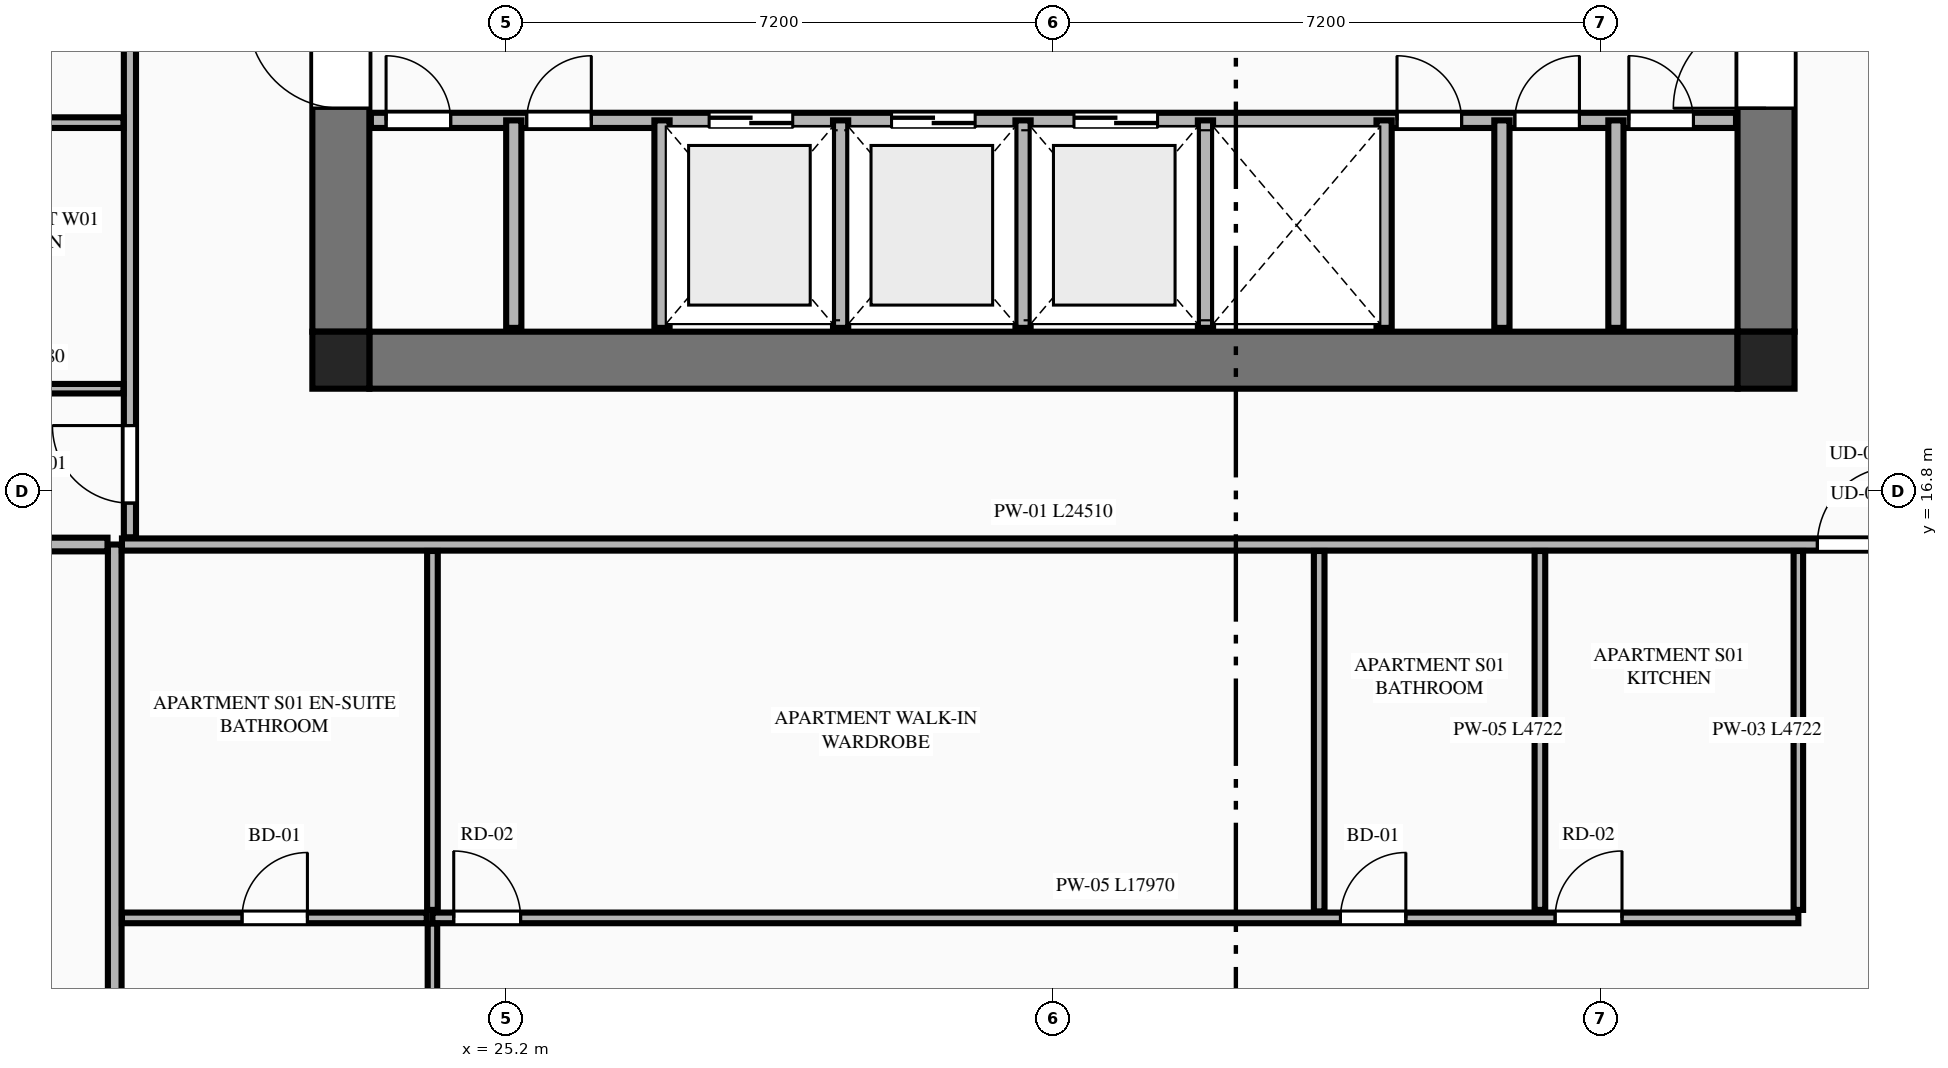
"""IFC4 building model, lengths in metres.
Left out: names, types, materials, properties, quantities, classifications, styles, units other than length and angle.
Written with IfcOpenShell. Run it as: python <this file> out.ifc"""

import sys

from ifc_helpers import new_model, si_unit, direction, frame, frame_2d, origin, origin_2d, place, context, subcontext, project, spatial, rectangle, extrude, element, fill, save


model = new_model("IFC4")
c1 = context("Model", 3, precision=1e-05, world=origin(), true_north=direction((0.0, 1.0)))
c2 = subcontext(c1, "Body", "Model", "MODEL_VIEW")
j1 = project(units=[si_unit("LENGTHUNIT", "METRE"), si_unit("PLANEANGLEUNIT", "RADIAN")], contexts=[c1])
p1 = place(None, origin())
s1 = spatial("IfcSite", under=j1, at=p1, CompositionType="ELEMENT")
p2 = place(p1, origin())
s2 = spatial("IfcBuilding", under=s1, at=p2, CompositionType="ELEMENT")
p3 = place(p2, frame((0.0, 0.0, 80.0)))
s3 = spatial("IfcBuildingStorey", under=s2, at=p3, CompositionType="ELEMENT", Elevation=80.0)
for number, where, z_axis, x_axis in (
    (1, (23.025, 18.525, 0.0), (0.0, 0.0, 1.0), (1.0, 0.0, 0.0)),
    (2, (41.775, 18.525, 0.0), (0.0, 0.0, 1.0), (1.0, 0.0, 0.0)),
):
    element("IfcColumn", number, at=place(p3, frame(where, z_axis=z_axis, x_axis=x_axis)), inside=s3, PredefinedType="COLUMN", context=c2, shape_type="SweptSolid", body=[
        extrude(rectangle(XDim=0.75, YDim=0.75, at=origin_2d()), origin(), (0.0, 0.0, 1.0), 3.55),
    ])
p4 = place(p3, frame((23.4, 18.525, 0.0), z_axis=(0.0, 0.0, 1.0), x_axis=(1.0, 0.0, 0.0)))
e3 = element("IfcWall", 3, at=p4, inside=s3, PredefinedType="SHEAR", context=c2, shape_type="SweptSolid", body=[
    extrude(rectangle(XDim=18.0, YDim=0.75, at=frame_2d((9.0, 0.0))), origin(), (0.0, 0.0, 1.0), 3.33),
])
p5 = place(p3, frame((23.025, 18.9, 0.0), z_axis=(0.0, 0.0, 1.0), x_axis=(0.0, 1.0, 0.0)))
e4 = element("IfcWall", 4, at=p5, inside=s3, PredefinedType="SHEAR", context=c2, shape_type="SweptSolid", body=[
    extrude(rectangle(XDim=14.0, YDim=0.75, at=frame_2d((7.0, 0.0))), origin(), (0.0, 0.0, 1.0), 3.33),
])
p6 = place(p5, frame((2.94, 0.0, 0.0)))
e5 = element("IfcOpeningElement", 5, at=p6, cuts=e4, PredefinedType="OPENING", context=c2, shape_type="SweptSolid", body=[
    extrude(rectangle(XDim=1.22, YDim=2.25, at=frame_2d((0.61, 1.125))), frame((0.0, 0.385, 0.0), z_axis=(0.0, -1.0, 0.0), x_axis=(1.0, 0.0, 0.0)), (0.0, 0.0, 1.0), 0.77),
])
p7 = place(p3, frame((41.775, 18.9, 0.0), z_axis=(0.0, 0.0, 1.0), x_axis=(0.0, 1.0, 0.0)))
e6 = element("IfcWall", 6, at=p7, inside=s3, PredefinedType="SHEAR", context=c2, shape_type="SweptSolid", body=[
    extrude(rectangle(XDim=14.0, YDim=0.75, at=frame_2d((7.0, 0.0))), origin(), (0.0, 0.0, 1.0), 3.33),
])
p8 = place(p7, frame((2.94, 0.0, 0.0)))
e7 = element("IfcOpeningElement", 7, at=p8, cuts=e6, PredefinedType="OPENING", context=c2, shape_type="SweptSolid", body=[
    extrude(rectangle(XDim=1.22, YDim=2.25, at=frame_2d((0.61, 1.125))), frame((0.0, 0.385, 0.0), z_axis=(0.0, -1.0, 0.0), x_axis=(1.0, 0.0, 0.0)), (0.0, 0.0, 1.0), 0.77),
])
p9 = place(p3, frame((23.42, 21.68, 0.0), z_axis=(0.0, 0.0, 1.0), x_axis=(1.0, 0.0, 0.0)))
e8 = element("IfcWall", 8, at=p9, inside=s3, PredefinedType="PLUMBINGWALL", context=c2, shape_type="SweptSolid", body=[
    extrude(rectangle(XDim=17.96, YDim=0.2, at=frame_2d((8.98, 0.0))), origin(), (0.0, 0.0, 1.0), 3.33),
])
p10 = place(p9, frame((4.45, 0.0, 0.0)))
e9 = element("IfcOpeningElement", 9, at=p10, cuts=e8, PredefinedType="OPENING", context=c2, shape_type="SweptSolid", body=[
    extrude(rectangle(XDim=1.1, YDim=2.2, at=frame_2d((0.55, 1.1))), frame((0.0, 0.11, 0.0), z_axis=(0.0, -1.0, 0.0), x_axis=(1.0, 0.0, 0.0)), (0.0, 0.0, 1.0), 0.22),
])
p11 = place(p9, frame((6.85, 0.0, 0.0)))
e10 = element("IfcOpeningElement", 10, at=p11, cuts=e8, PredefinedType="OPENING", context=c2, shape_type="SweptSolid", body=[
    extrude(rectangle(XDim=1.1, YDim=2.2, at=frame_2d((0.55, 1.1))), frame((0.0, 0.11, 0.0), z_axis=(0.0, -1.0, 0.0), x_axis=(1.0, 0.0, 0.0)), (0.0, 0.0, 1.0), 0.22),
])
p12 = place(p9, frame((9.25, 0.0, 0.0)))
e11 = element("IfcOpeningElement", 11, at=p12, cuts=e8, PredefinedType="OPENING", context=c2, shape_type="SweptSolid", body=[
    extrude(rectangle(XDim=1.1, YDim=2.2, at=frame_2d((0.55, 1.1))), frame((0.0, 0.11, 0.0), z_axis=(0.0, -1.0, 0.0), x_axis=(1.0, 0.0, 0.0)), (0.0, 0.0, 1.0), 0.22),
])
p13 = place(p9, frame((0.2, 0.0, 0.0)))
e12 = element("IfcOpeningElement", 12, at=p13, cuts=e8, PredefinedType="OPENING", context=c2, shape_type="SweptSolid", body=[
    extrude(rectangle(XDim=0.85, YDim=2.05, at=frame_2d((0.425, 1.025))), frame((0.0, 0.11, 0.0), z_axis=(0.0, -1.0, 0.0), x_axis=(1.0, 0.0, 0.0)), (0.0, 0.0, 1.0), 0.22),
])
p14 = place(p9, frame((2.05, 0.0, 0.0)))
e13 = element("IfcOpeningElement", 13, at=p14, cuts=e8, PredefinedType="OPENING", context=c2, shape_type="SweptSolid", body=[
    extrude(rectangle(XDim=0.85, YDim=2.05, at=frame_2d((0.425, 1.025))), frame((0.0, 0.11, 0.0), z_axis=(0.0, -1.0, 0.0), x_axis=(1.0, 0.0, 0.0)), (0.0, 0.0, 1.0), 0.22),
])
p15 = place(p9, frame((13.5, 0.0, 0.0)))
e14 = element("IfcOpeningElement", 14, at=p15, cuts=e8, PredefinedType="OPENING", context=c2, shape_type="SweptSolid", body=[
    extrude(rectangle(XDim=0.85, YDim=2.05, at=frame_2d((0.425, 1.025))), frame((0.0, 0.11, 0.0), z_axis=(0.0, -1.0, 0.0), x_axis=(1.0, 0.0, 0.0)), (0.0, 0.0, 1.0), 0.22),
])
p16 = place(p9, frame((15.05, 0.0, 0.0)))
e15 = element("IfcOpeningElement", 15, at=p16, cuts=e8, PredefinedType="OPENING", context=c2, shape_type="SweptSolid", body=[
    extrude(rectangle(XDim=0.85, YDim=2.05, at=frame_2d((0.425, 1.025))), frame((0.0, 0.11, 0.0), z_axis=(0.0, -1.0, 0.0), x_axis=(1.0, 0.0, 0.0)), (0.0, 0.0, 1.0), 0.22),
])
p17 = place(p9, frame((16.55, 0.0, 0.0)))
e16 = element("IfcOpeningElement", 16, at=p17, cuts=e8, PredefinedType="OPENING", context=c2, shape_type="SweptSolid", body=[
    extrude(rectangle(XDim=0.85, YDim=2.05, at=frame_2d((0.425, 1.025))), frame((0.0, 0.11, 0.0), z_axis=(0.0, -1.0, 0.0), x_axis=(1.0, 0.0, 0.0)), (0.0, 0.0, 1.0), 0.22),
])
for number, where, z_axis, x_axis in (
    (17, (27.25, 18.95, 0.0), (0.0, 0.0, 1.0), (0.0, 1.0, 0.0)),
    (18, (29.6, 18.95, 0.0), (0.0, 0.0, 1.0), (0.0, 1.0, 0.0)),
    (19, (32.0, 18.95, 0.0), (0.0, 0.0, 1.0), (0.0, 1.0, 0.0)),
    (20, (34.4, 18.95, 0.0), (0.0, 0.0, 1.0), (0.0, 1.0, 0.0)),
    (21, (36.75, 18.95, 0.0), (0.0, 0.0, 1.0), (0.0, 1.0, 0.0)),
    (22, (25.3, 18.95, 0.0), (0.0, 0.0, 1.0), (0.0, 1.0, 0.0)),
    (23, (38.3, 18.95, 0.0), (0.0, 0.0, 1.0), (0.0, 1.0, 0.0)),
    (24, (39.8, 18.95, 0.0), (0.0, 0.0, 1.0), (0.0, 1.0, 0.0)),
):
    element("IfcWall", number, at=place(p3, frame(where, z_axis=z_axis, x_axis=x_axis)), inside=s3, PredefinedType="PLUMBINGWALL", context=c2, shape_type="SweptSolid", body=[
        extrude(rectangle(XDim=2.73, YDim=0.2, at=frame_2d((1.365, 0.0))), origin(), (0.0, 0.0, 1.0), 3.33),
    ])
p18 = place(p3, frame((20.05, 2.455, 0.0), z_axis=(0.0, 0.0, 1.0), x_axis=(0.0, 1.0, 0.0)))
e25 = element("IfcWall", 25, at=p18, inside=s3, PredefinedType="PARTITIONING", context=c2, shape_type="SweptSolid", body=[
    extrude(rectangle(XDim=13.645, YDim=0.18, at=frame_2d((6.823, 0.0))), origin(), (0.0, 0.0, 1.0), 3.33),
])
p19 = place(p3, frame((20.145, 16.1, 0.0), z_axis=(0.0, 0.0, 1.0), x_axis=(1.0, 0.0, 0.0)))
e26 = element("IfcWall", 26, at=p19, inside=s3, PredefinedType="PARTITIONING", context=c2, shape_type="SweptSolid", body=[
    extrude(rectangle(XDim=24.51, YDim=0.16, at=frame_2d((12.255, 0.0))), origin(), (0.0, 0.0, 1.0), 3.33),
])
p20 = place(p19, frame((22.305, 0.0, 0.0)))
e27 = element("IfcOpeningElement", 27, at=p20, cuts=e26, PredefinedType="OPENING", context=c2, shape_type="SweptSolid", body=[
    extrude(rectangle(XDim=1.02, YDim=2.25, at=frame_2d((0.51, 1.125))), frame((0.0, 0.09, 0.0), z_axis=(0.0, -1.0, 0.0), x_axis=(1.0, 0.0, 0.0)), (0.0, 0.0, 1.0), 0.18),
])
p21 = place(p3, frame((42.2, 11.293, 0.0), z_axis=(0.0, 0.0, 1.0), x_axis=(0.0, 1.0, 0.0)))
e28 = element("IfcWall", 28, at=p21, inside=s3, PredefinedType="PARTITIONING", context=c2, shape_type="SweptSolid", body=[
    extrude(rectangle(XDim=4.722, YDim=0.125, at=frame_2d((2.361, 0.0))), origin(), (0.0, 0.0, 1.0), 2.7),
])
p22 = place(p3, frame((24.23, 11.188, 0.0), z_axis=(0.0, 0.0, 1.0), x_axis=(1.0, 0.0, 0.0)))
e29 = element("IfcWall", 29, at=p22, inside=s3, PredefinedType="PLUMBINGWALL", context=c2, shape_type="SweptSolid", body=[
    extrude(rectangle(XDim=17.97, YDim=0.14, at=frame_2d((8.985, 0.0))), origin(), (0.0, 0.0, 1.0), 3.33),
])
p23 = place(p22, frame((0.28, 0.0, 0.0)))
e30 = element("IfcOpeningElement", 30, at=p23, cuts=e29, PredefinedType="OPENING", context=c2, shape_type="SweptSolid", body=[
    extrude(rectangle(XDim=0.88, YDim=2.15, at=frame_2d((0.44, 1.075))), frame((0.0, 0.08, 0.0), z_axis=(0.0, -1.0, 0.0), x_axis=(1.0, 0.0, 0.0)), (0.0, 0.0, 1.0), 0.16),
])
p24 = place(p22, frame((11.946, 0.0, 0.0)))
e31 = element("IfcOpeningElement", 31, at=p24, cuts=e29, PredefinedType="OPENING", context=c2, shape_type="SweptSolid", body=[
    extrude(rectangle(XDim=0.86, YDim=2.1, at=frame_2d((0.43, 1.05))), frame((0.0, 0.08, 0.0), z_axis=(0.0, -1.0, 0.0), x_axis=(1.0, 0.0, 0.0)), (0.0, 0.0, 1.0), 0.16),
])
p25 = place(p22, frame((14.77, 0.0, 0.0)))
e32 = element("IfcOpeningElement", 32, at=p25, cuts=e29, PredefinedType="OPENING", context=c2, shape_type="SweptSolid", body=[
    extrude(rectangle(XDim=0.88, YDim=2.15, at=frame_2d((0.44, 1.075))), frame((0.0, 0.08, 0.0), z_axis=(0.0, -1.0, 0.0), x_axis=(1.0, 0.0, 0.0)), (0.0, 0.0, 1.0), 0.16),
])
p26 = place(p3, frame((20.145, 11.188, 0.0), z_axis=(0.0, 0.0, 1.0), x_axis=(1.0, 0.0, 0.0)))
e33 = element("IfcWall", 33, at=p26, inside=s3, PredefinedType="PLUMBINGWALL", context=c2, shape_type="SweptSolid", body=[
    extrude(rectangle(XDim=4.01, YDim=0.14, at=frame_2d((2.005, 0.0))), origin(), (0.0, 0.0, 1.0), 3.33),
])
p27 = place(p26, frame((1.58, 0.0, 0.0)))
e34 = element("IfcOpeningElement", 34, at=p27, cuts=e33, PredefinedType="OPENING", context=c2, shape_type="SweptSolid", body=[
    extrude(rectangle(XDim=0.86, YDim=2.1, at=frame_2d((0.43, 1.05))), frame((0.0, 0.08, 0.0), z_axis=(0.0, -1.0, 0.0), x_axis=(1.0, 0.0, 0.0)), (0.0, 0.0, 1.0), 0.16),
])
for number, where, z_axis, x_axis in (
    (35, (38.8, 11.293, 0.0), (0.0, 0.0, 1.0), (0.0, 1.0, 0.0)),
    (36, (24.23, 11.293, 0.0), (0.0, 0.0, 1.0), (0.0, 1.0, 0.0)),
):
    element("IfcWall", number, at=place(p3, frame(where, z_axis=z_axis, x_axis=x_axis)), inside=s3, PredefinedType="PLUMBINGWALL", context=c2, shape_type="SweptSolid", body=[
        extrude(rectangle(XDim=4.722, YDim=0.14, at=frame_2d((2.361, 0.0))), origin(), (0.0, 0.0, 1.0), 3.33),
    ])
p28 = place(p3, frame((24.23, 2.365, 0.0), z_axis=(0.0, 0.0, 1.0), x_axis=(0.0, 1.0, 0.0)))
e37 = element("IfcWall", 37, at=p28, inside=s3, PredefinedType="PARTITIONING", context=c2, shape_type="SweptSolid", body=[
    extrude(rectangle(XDim=8.748, YDim=0.125, at=frame_2d((4.374, 0.0))), origin(), (0.0, 0.0, 1.0), 3.33),
])
p29 = place(p28, frame((0.35, 0.0, 0.0)))
e38 = element("IfcOpeningElement", 38, at=p29, cuts=e37, PredefinedType="OPENING", context=c2, shape_type="SweptSolid", body=[
    extrude(rectangle(XDim=0.92, YDim=2.15, at=frame_2d((0.46, 1.075))), frame((0.0, 0.073, 0.0), z_axis=(0.0, -1.0, 0.0), x_axis=(1.0, 0.0, 0.0)), (0.0, 0.0, 1.0), 0.145),
])
p30 = place(p3, frame((35.896, 11.273, 0.0), z_axis=(0.0, 0.0, 1.0), x_axis=(0.0, 1.0, 0.0)))
e39 = element("IfcWall", 39, at=p30, inside=s3, PredefinedType="PLUMBINGWALL", context=c2, shape_type="SweptSolid", body=[
    extrude(rectangle(XDim=4.742, YDim=0.14, at=frame_2d((2.371, 0.0))), origin(), (0.0, 0.0, 1.0), 3.33),
])
p31 = place(p3, frame((10.488, 16.1, 0.0), z_axis=(0.0, 0.0, 1.0), x_axis=(1.0, 0.0, 0.0)))
e40 = element("IfcWall", 40, at=p31, inside=s3, PredefinedType="PARTITIONING", context=c2, shape_type="SweptSolid", body=[
    extrude(rectangle(XDim=9.467, YDim=0.18, at=frame_2d((4.733, 0.0))), origin(), (0.0, 0.0, 1.0), 3.33),
])
p32 = place(p3, frame((20.25, 16.195, 0.0), z_axis=(0.0, 0.0, 1.0), x_axis=(0.0, 1.0, 0.0)))
e41 = element("IfcWall", 41, at=p32, inside=s3, PredefinedType="PARTITIONING", context=c2, shape_type="SweptSolid", body=[
    extrude(rectangle(XDim=19.41, YDim=0.16, at=frame_2d((9.705, 0.0))), origin(), (0.0, 0.0, 1.0), 2.7),
])
p33 = place(p32, frame((0.45, 0.0, 0.0)))
e42 = element("IfcOpeningElement", 42, at=p33, cuts=e41, PredefinedType="OPENING", context=c2, shape_type="SweptSolid", body=[
    extrude(rectangle(XDim=1.02, YDim=2.25, at=frame_2d((0.51, 1.125))), frame((0.0, 0.09, 0.0), z_axis=(0.0, -1.0, 0.0), x_axis=(1.0, 0.0, 0.0)), (0.0, 0.0, 1.0), 0.18),
])
p34 = place(p3, frame((17.185, 18.15, 0.0), z_axis=(0.0, 0.0, 1.0), x_axis=(1.0, 0.0, 0.0)))
e43 = element("IfcWall", 43, at=p34, inside=s3, PredefinedType="PARTITIONING", context=c2, shape_type="SweptSolid", body=[
    extrude(rectangle(XDim=2.98, YDim=0.125, at=frame_2d((1.49, 0.0))), origin(), (0.0, 0.0, 1.0), 2.7),
])
p35 = place(p3, frame((17.185, 21.65, 0.0), z_axis=(0.0, 0.0, 1.0), x_axis=(1.0, 0.0, 0.0)))
e44 = element("IfcWall", 44, at=p35, inside=s3, PredefinedType="PLUMBINGWALL", context=c2, shape_type="SweptSolid", body=[
    extrude(rectangle(XDim=2.98, YDim=0.14, at=frame_2d((1.49, 0.0))), origin(), (0.0, 0.0, 1.0), 3.33),
])
p36 = place(p6, origin())
e45 = element("IfcDoor", 45, at=p36, inside=s3, OperationType="SINGLE_SWING_RIGHT", PredefinedType="DOOR", context=c2, shape_type="SweptSolid", body=[
    extrude(rectangle(XDim=1.22, YDim=2.25, at=frame_2d((0.61, 1.125))), frame((0.0, 0.025, 0.0), z_axis=(0.0, -1.0, 0.0), x_axis=(1.0, 0.0, 0.0)), (0.0, 0.0, 1.0), 0.05),
])
fill(e5, e45)
p37 = place(p8, origin())
e46 = element("IfcDoor", 46, at=p37, inside=s3, OperationType="SINGLE_SWING_LEFT", PredefinedType="DOOR", context=c2, shape_type="SweptSolid", body=[
    extrude(rectangle(XDim=1.22, YDim=2.25, at=frame_2d((0.61, 1.125))), frame((0.0, 0.025, 0.0), z_axis=(0.0, -1.0, 0.0), x_axis=(1.0, 0.0, 0.0)), (0.0, 0.0, 1.0), 0.05),
])
fill(e7, e46)
p38 = place(p10, origin())
e47 = element("IfcDoor", 47, at=p38, inside=s3, OperationType="DOUBLE_DOOR_SLIDING", PredefinedType="DOOR", context=c2, shape_type="SweptSolid", body=[
    extrude(rectangle(XDim=1.1, YDim=2.2, at=frame_2d((0.55, 1.1))), frame((0.0, 0.025, 0.0), z_axis=(0.0, -1.0, 0.0), x_axis=(1.0, 0.0, 0.0)), (0.0, 0.0, 1.0), 0.05),
])
fill(e9, e47)
p39 = place(p11, origin())
e48 = element("IfcDoor", 48, at=p39, inside=s3, OperationType="DOUBLE_DOOR_SLIDING", PredefinedType="DOOR", context=c2, shape_type="SweptSolid", body=[
    extrude(rectangle(XDim=1.1, YDim=2.2, at=frame_2d((0.55, 1.1))), frame((0.0, 0.025, 0.0), z_axis=(0.0, -1.0, 0.0), x_axis=(1.0, 0.0, 0.0)), (0.0, 0.0, 1.0), 0.05),
])
fill(e10, e48)
p40 = place(p12, origin())
e49 = element("IfcDoor", 49, at=p40, inside=s3, OperationType="DOUBLE_DOOR_SLIDING", PredefinedType="DOOR", context=c2, shape_type="SweptSolid", body=[
    extrude(rectangle(XDim=1.1, YDim=2.2, at=frame_2d((0.55, 1.1))), frame((0.0, 0.025, 0.0), z_axis=(0.0, -1.0, 0.0), x_axis=(1.0, 0.0, 0.0)), (0.0, 0.0, 1.0), 0.05),
])
fill(e11, e49)
p41 = place(p13, origin())
e50 = element("IfcDoor", 50, at=p41, inside=s3, OperationType="SINGLE_SWING_LEFT", PredefinedType="DOOR", context=c2, shape_type="SweptSolid", body=[
    extrude(rectangle(XDim=0.85, YDim=2.05, at=frame_2d((0.425, 1.025))), frame((0.0, 0.025, 0.0), z_axis=(0.0, -1.0, 0.0), x_axis=(1.0, 0.0, 0.0)), (0.0, 0.0, 1.0), 0.05),
])
fill(e12, e50)
p42 = place(p14, origin())
e51 = element("IfcDoor", 51, at=p42, inside=s3, OperationType="SINGLE_SWING_RIGHT", PredefinedType="DOOR", context=c2, shape_type="SweptSolid", body=[
    extrude(rectangle(XDim=0.85, YDim=2.05, at=frame_2d((0.425, 1.025))), frame((0.0, 0.025, 0.0), z_axis=(0.0, -1.0, 0.0), x_axis=(1.0, 0.0, 0.0)), (0.0, 0.0, 1.0), 0.05),
])
fill(e13, e51)
p43 = place(p15, origin())
e52 = element("IfcDoor", 52, at=p43, inside=s3, OperationType="SINGLE_SWING_LEFT", PredefinedType="DOOR", context=c2, shape_type="SweptSolid", body=[
    extrude(rectangle(XDim=0.85, YDim=2.05, at=frame_2d((0.425, 1.025))), frame((0.0, 0.025, 0.0), z_axis=(0.0, -1.0, 0.0), x_axis=(1.0, 0.0, 0.0)), (0.0, 0.0, 1.0), 0.05),
])
fill(e14, e52)
p44 = place(p16, origin())
e53 = element("IfcDoor", 53, at=p44, inside=s3, OperationType="SINGLE_SWING_RIGHT", PredefinedType="DOOR", context=c2, shape_type="SweptSolid", body=[
    extrude(rectangle(XDim=0.85, YDim=2.05, at=frame_2d((0.425, 1.025))), frame((0.0, 0.025, 0.0), z_axis=(0.0, -1.0, 0.0), x_axis=(1.0, 0.0, 0.0)), (0.0, 0.0, 1.0), 0.05),
])
fill(e15, e53)
p45 = place(p17, origin())
e54 = element("IfcDoor", 54, at=p45, inside=s3, OperationType="SINGLE_SWING_LEFT", PredefinedType="DOOR", context=c2, shape_type="SweptSolid", body=[
    extrude(rectangle(XDim=0.85, YDim=2.05, at=frame_2d((0.425, 1.025))), frame((0.0, 0.025, 0.0), z_axis=(0.0, -1.0, 0.0), x_axis=(1.0, 0.0, 0.0)), (0.0, 0.0, 1.0), 0.05),
])
fill(e16, e54)
p46 = place(p23, origin())
e55 = element("IfcDoor", 55, at=p46, inside=s3, OperationType="SINGLE_SWING_LEFT", PredefinedType="DOOR", context=c2, shape_type="SweptSolid", body=[
    extrude(rectangle(XDim=0.88, YDim=2.15, at=frame_2d((0.44, 1.075))), frame((0.0, 0.025, 0.0), z_axis=(0.0, -1.0, 0.0), x_axis=(1.0, 0.0, 0.0)), (0.0, 0.0, 1.0), 0.05),
])
fill(e30, e55)
p47 = place(p24, origin())
e56 = element("IfcDoor", 56, at=p47, inside=s3, OperationType="SINGLE_SWING_RIGHT", PredefinedType="DOOR", context=c2, shape_type="SweptSolid", body=[
    extrude(rectangle(XDim=0.86, YDim=2.1, at=frame_2d((0.43, 1.05))), frame((0.0, 0.025, 0.0), z_axis=(0.0, -1.0, 0.0), x_axis=(1.0, 0.0, 0.0)), (0.0, 0.0, 1.0), 0.05),
])
fill(e31, e56)
p48 = place(p27, origin())
e57 = element("IfcDoor", 57, at=p48, inside=s3, OperationType="SINGLE_SWING_RIGHT", PredefinedType="DOOR", context=c2, shape_type="SweptSolid", body=[
    extrude(rectangle(XDim=0.86, YDim=2.1, at=frame_2d((0.43, 1.05))), frame((0.0, 0.025, 0.0), z_axis=(0.0, -1.0, 0.0), x_axis=(1.0, 0.0, 0.0)), (0.0, 0.0, 1.0), 0.05),
])
fill(e34, e57)
p49 = place(p20, origin())
e58 = element("IfcDoor", 58, at=p49, inside=s3, OperationType="SINGLE_SWING_RIGHT", PredefinedType="DOOR", context=c2, shape_type="SweptSolid", body=[
    extrude(rectangle(XDim=1.02, YDim=2.25, at=frame_2d((0.51, 1.125))), frame((0.0, 0.025, 0.0), z_axis=(0.0, -1.0, 0.0), x_axis=(1.0, 0.0, 0.0)), (0.0, 0.0, 1.0), 0.05),
])
fill(e27, e58)
p50 = place(p25, origin())
e59 = element("IfcDoor", 59, at=p50, inside=s3, OperationType="SINGLE_SWING_RIGHT", PredefinedType="DOOR", context=c2, shape_type="SweptSolid", body=[
    extrude(rectangle(XDim=0.88, YDim=2.15, at=frame_2d((0.44, 1.075))), frame((0.0, 0.025, 0.0), z_axis=(0.0, -1.0, 0.0), x_axis=(1.0, 0.0, 0.0)), (0.0, 0.0, 1.0), 0.05),
])
fill(e32, e59)
p51 = place(p33, origin())
e60 = element("IfcDoor", 60, at=p51, inside=s3, OperationType="SINGLE_SWING_RIGHT", PredefinedType="DOOR", context=c2, shape_type="SweptSolid", body=[
    extrude(rectangle(XDim=1.02, YDim=2.25, at=frame_2d((0.51, 1.125))), frame((0.0, 0.025, 0.0), z_axis=(0.0, -1.0, 0.0), x_axis=(1.0, 0.0, 0.0)), (0.0, 0.0, 1.0), 0.05),
])
fill(e42, e60)
save(model, sys.argv[1])
